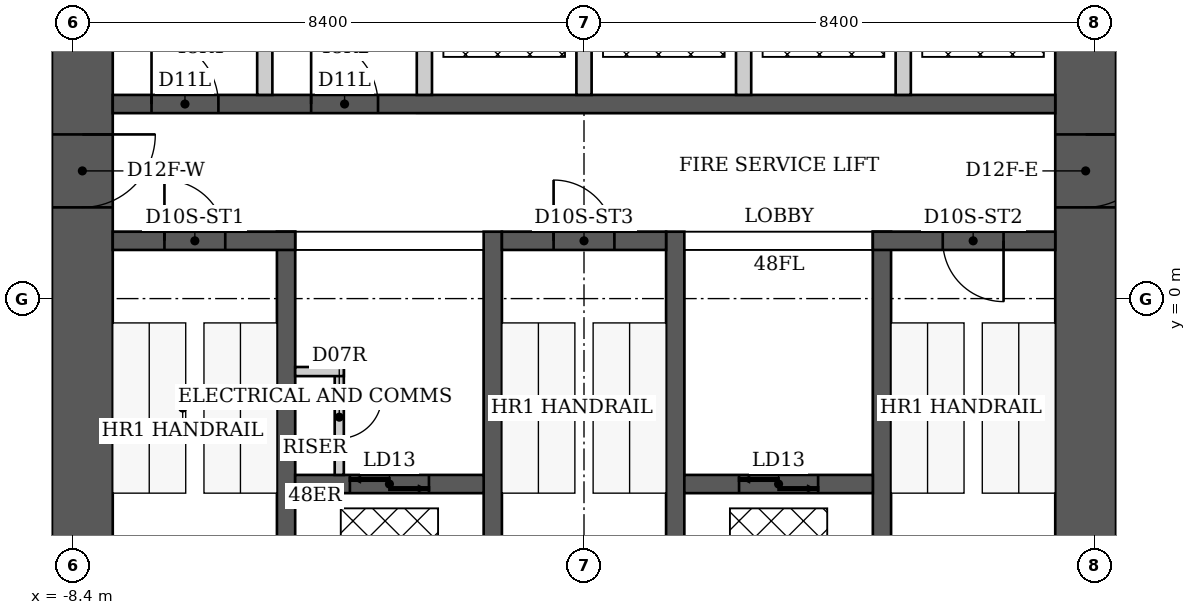
"""IFC4 building model, lengths in metres.
Left out: names, types, materials, properties, quantities, classifications, styles, units other than length and angle.
Written with IfcOpenShell. Run it as: python <this file> out.ifc"""

import sys

from ifc_helpers import new_model, si_unit, direction, frame, frame_2d, origin, place, context, subcontext, project, spatial, rectangle, extrude, element, fill, save


model = new_model("IFC4")
c1 = context("Model", 3, precision=1e-05, world=origin(), true_north=direction((0.0, 1.0)))
c2 = subcontext(c1, "Body", "Model", "MODEL_VIEW")
j1 = project(units=[si_unit("LENGTHUNIT", "METRE"), si_unit("PLANEANGLEUNIT", "RADIAN")], contexts=[c1])
p1 = place(None, origin())
s1 = spatial("IfcSite", under=j1, at=p1, CompositionType="ELEMENT")
p2 = place(p1, origin())
s2 = spatial("IfcBuilding", under=s1, at=p2, CompositionType="ELEMENT")
p3 = place(p2, frame((0.0, 0.0, 194.6)))
s3 = spatial("IfcBuildingStorey", under=s2, at=p3, CompositionType="ELEMENT", Elevation=194.6)
p4 = place(p3, frame((-8.25, -6.1, 0.0), z_axis=(0.0, 0.0, 1.0), x_axis=(0.0, 1.0, 0.0)))
e1 = element("IfcWall", 1, at=p4, inside=s3, PredefinedType="SHEAR", context=c2, shape_type="SweptSolid", body=[
    extrude(rectangle(XDim=12.2, YDim=1.0, at=frame_2d((6.1, 0.0))), origin(), (0.0, 0.0, 1.0), 3.8),
])
p5 = place(p4, frame((7.6, 0.0, 0.0)))
e2 = element("IfcOpeningElement", 2, at=p5, cuts=e1, PredefinedType="OPENING", context=c2, shape_type="SweptSolid", body=[
    extrude(rectangle(XDim=1.2, YDim=2.2, at=frame_2d((0.6, 1.1))), frame((0.0, 0.5, 0.0), z_axis=(0.0, -1.0, 0.0), x_axis=(1.0, 0.0, 0.0)), (0.0, 0.0, 1.0), 1.0),
])
p6 = place(p3, frame((8.25, -6.1, 0.0), z_axis=(0.0, 0.0, 1.0), x_axis=(0.0, 1.0, 0.0)))
e3 = element("IfcWall", 3, at=p6, inside=s3, PredefinedType="SHEAR", context=c2, shape_type="SweptSolid", body=[
    extrude(rectangle(XDim=12.2, YDim=1.0, at=frame_2d((6.1, 0.0))), origin(), (0.0, 0.0, 1.0), 3.8),
])
p7 = place(p6, frame((7.6, 0.0, 0.0)))
e4 = element("IfcOpeningElement", 4, at=p7, cuts=e3, PredefinedType="OPENING", context=c2, shape_type="SweptSolid", body=[
    extrude(rectangle(XDim=1.2, YDim=2.2, at=frame_2d((0.6, 1.1))), frame((0.0, 0.5, 0.0), z_axis=(0.0, -1.0, 0.0), x_axis=(1.0, 0.0, 0.0)), (0.0, 0.0, 1.0), 1.0),
])
for number, where, z_axis, x_axis in (
    (5, (-4.9, -6.1, 0.0), (0.0, 0.0, 1.0), (0.0, 1.0, 0.0)),
    (6, (-1.5, -6.1, 0.0), (0.0, 0.0, 1.0), (0.0, 1.0, 0.0)),
    (7, (1.5, -6.1, 0.0), (0.0, 0.0, 1.0), (0.0, 1.0, 0.0)),
    (8, (4.9, -6.1, 0.0), (0.0, 0.0, 1.0), (0.0, 1.0, 0.0)),
):
    element("IfcWall", number, at=place(p3, frame(where, z_axis=z_axis, x_axis=x_axis)), inside=s3, PredefinedType="SHEAR", context=c2, shape_type="SweptSolid", body=[
        extrude(rectangle(XDim=7.2, YDim=0.3, at=frame_2d((3.6, 0.0))), origin(), (0.0, 0.0, 1.0), 3.8),
    ])
p8 = place(p3, frame((-7.75, 0.95, 0.0), z_axis=(0.0, 0.0, 1.0), x_axis=(1.0, 0.0, 0.0)))
e9 = element("IfcWall", 9, at=p8, inside=s3, PredefinedType="SHEAR", context=c2, shape_type="SweptSolid", body=[
    extrude(rectangle(XDim=3.0, YDim=0.3, at=frame_2d((1.5, 0.0))), origin(), (0.0, 0.0, 1.0), 3.8),
])
p9 = place(p8, frame((0.85, 0.0, 0.0)))
e10 = element("IfcOpeningElement", 10, at=p9, cuts=e9, PredefinedType="OPENING", context=c2, shape_type="SweptSolid", body=[
    extrude(rectangle(XDim=1.0, YDim=2.2, at=frame_2d((0.5, 1.1))), frame((0.0, 0.15, 0.0), z_axis=(0.0, -1.0, 0.0), x_axis=(1.0, 0.0, 0.0)), (0.0, 0.0, 1.0), 0.3),
])
p10 = place(p3, frame((-1.35, 0.95, 0.0), z_axis=(0.0, 0.0, 1.0), x_axis=(1.0, 0.0, 0.0)))
e11 = element("IfcWall", 11, at=p10, inside=s3, PredefinedType="SHEAR", context=c2, shape_type="SweptSolid", body=[
    extrude(rectangle(XDim=2.7, YDim=0.3, at=frame_2d((1.35, 0.0))), origin(), (0.0, 0.0, 1.0), 3.8),
])
p11 = place(p10, frame((0.85, 0.0, 0.0)))
e12 = element("IfcOpeningElement", 12, at=p11, cuts=e11, PredefinedType="OPENING", context=c2, shape_type="SweptSolid", body=[
    extrude(rectangle(XDim=1.0, YDim=2.2, at=frame_2d((0.5, 1.1))), frame((0.0, 0.15, 0.0), z_axis=(0.0, -1.0, 0.0), x_axis=(1.0, 0.0, 0.0)), (0.0, 0.0, 1.0), 0.3),
])
p12 = place(p3, frame((4.75, 0.95, 0.0), z_axis=(0.0, 0.0, 1.0), x_axis=(1.0, 0.0, 0.0)))
e13 = element("IfcWall", 13, at=p12, inside=s3, PredefinedType="SHEAR", context=c2, shape_type="SweptSolid", body=[
    extrude(rectangle(XDim=3.0, YDim=0.3, at=frame_2d((1.5, 0.0))), origin(), (0.0, 0.0, 1.0), 3.8),
])
p13 = place(p12, frame((1.15, 0.0, 0.0)))
e14 = element("IfcOpeningElement", 14, at=p13, cuts=e13, PredefinedType="OPENING", context=c2, shape_type="SweptSolid", body=[
    extrude(rectangle(XDim=1.0, YDim=2.2, at=frame_2d((0.5, 1.1))), frame((0.0, 0.15, 0.0), z_axis=(0.0, -1.0, 0.0), x_axis=(1.0, 0.0, 0.0)), (0.0, 0.0, 1.0), 0.3),
])
p14 = place(p3, frame((-4.75, -3.05, 0.0), z_axis=(0.0, 0.0, 1.0), x_axis=(1.0, 0.0, 0.0)))
e15 = element("IfcWall", 15, at=p14, inside=s3, PredefinedType="SHEAR", context=c2, shape_type="SweptSolid", body=[
    extrude(rectangle(XDim=3.1, YDim=0.3, at=frame_2d((1.55, 0.0))), origin(), (0.0, 0.0, 1.0), 3.8),
])
p15 = place(p14, frame((0.9, 0.0, 0.0)))
e16 = element("IfcOpeningElement", 16, at=p15, cuts=e15, PredefinedType="OPENING", context=c2, shape_type="SweptSolid", body=[
    extrude(rectangle(XDim=1.3, YDim=2.1, at=frame_2d((0.65, 1.05))), frame((0.0, 0.15, 0.0), z_axis=(0.0, -1.0, 0.0), x_axis=(1.0, 0.0, 0.0)), (0.0, 0.0, 1.0), 0.3),
])
p16 = place(p3, frame((1.65, -3.05, 0.0), z_axis=(0.0, 0.0, 1.0), x_axis=(1.0, 0.0, 0.0)))
e17 = element("IfcWall", 17, at=p16, inside=s3, PredefinedType="SHEAR", context=c2, shape_type="SweptSolid", body=[
    extrude(rectangle(XDim=3.1, YDim=0.3, at=frame_2d((1.55, 0.0))), origin(), (0.0, 0.0, 1.0), 3.8),
])
p17 = place(p16, frame((0.9, 0.0, 0.0)))
e18 = element("IfcOpeningElement", 18, at=p17, cuts=e17, PredefinedType="OPENING", context=c2, shape_type="SweptSolid", body=[
    extrude(rectangle(XDim=1.3, YDim=2.1, at=frame_2d((0.65, 1.05))), frame((0.0, 0.15, 0.0), z_axis=(0.0, -1.0, 0.0), x_axis=(1.0, 0.0, 0.0)), (0.0, 0.0, 1.0), 0.3),
])
p18 = place(p3, frame((-7.75, 3.2, 0.0), z_axis=(0.0, 0.0, 1.0), x_axis=(1.0, 0.0, 0.0)))
e19 = element("IfcWall", 19, at=p18, inside=s3, PredefinedType="SHEAR", context=c2, shape_type="SweptSolid", body=[
    extrude(rectangle(XDim=15.5, YDim=0.3, at=frame_2d((7.75, 0.0))), origin(), (0.0, 0.0, 1.0), 3.8),
])
p19 = place(p18, frame((0.637, 0.0, 0.0)))
e20 = element("IfcOpeningElement", 20, at=p19, cuts=e19, PredefinedType="OPENING", context=c2, shape_type="SweptSolid", body=[
    extrude(rectangle(XDim=1.1, YDim=2.2, at=frame_2d((0.55, 1.1))), frame((0.0, 0.15, 0.0), z_axis=(0.0, -1.0, 0.0), x_axis=(1.0, 0.0, 0.0)), (0.0, 0.0, 1.0), 0.3),
])
p20 = place(p18, frame((3.262, 0.0, 0.0)))
e21 = element("IfcOpeningElement", 21, at=p20, cuts=e19, PredefinedType="OPENING", context=c2, shape_type="SweptSolid", body=[
    extrude(rectangle(XDim=1.1, YDim=2.2, at=frame_2d((0.55, 1.1))), frame((0.0, 0.15, 0.0), z_axis=(0.0, -1.0, 0.0), x_axis=(1.0, 0.0, 0.0)), (0.0, 0.0, 1.0), 0.3),
])
for number, where, z_axis, x_axis in (
    (22, (-5.25, 3.35, 0.0), (0.0, 0.0, 1.0), (0.0, 1.0, 0.0)),
    (23, (-2.625, 3.35, 0.0), (0.0, 0.0, 1.0), (0.0, 1.0, 0.0)),
    (24, (0.0, 3.35, 0.0), (0.0, 0.0, 1.0), (0.0, 1.0, 0.0)),
    (25, (2.625, 3.35, 0.0), (0.0, 0.0, 1.0), (0.0, 1.0, 0.0)),
    (26, (5.25, 3.35, 0.0), (0.0, 0.0, 1.0), (0.0, 1.0, 0.0)),
):
    element("IfcWall", number, at=place(p3, frame(where, z_axis=z_axis, x_axis=x_axis)), inside=s3, PredefinedType="PARTITIONING", context=c2, shape_type="SweptSolid", body=[
        extrude(rectangle(XDim=2.75, YDim=0.25, at=frame_2d((1.375, 0.0))), origin(), (0.0, 0.0, 1.0), 3.8),
    ])
p21 = place(p3, frame((-4.025, -2.9, 0.0), z_axis=(0.0, 0.0, 1.0), x_axis=(0.0, 1.0, 0.0)))
e27 = element("IfcWall", 27, at=p21, inside=s3, PredefinedType="PARTITIONING", context=c2, shape_type="SweptSolid", body=[
    extrude(rectangle(XDim=1.775, YDim=0.15, at=frame_2d((0.887, 0.0))), origin(), (0.0, 0.0, 1.0), 3.64),
])
p22 = place(p21, frame((0.6, 0.0, 0.0)))
e28 = element("IfcOpeningElement", 28, at=p22, cuts=e27, PredefinedType="OPENING", context=c2, shape_type="SweptSolid", body=[
    extrude(rectangle(XDim=0.7, YDim=2.1, at=frame_2d((0.35, 1.05))), frame((0.0, 0.075, 0.0), z_axis=(0.0, -1.0, 0.0), x_axis=(1.0, 0.0, 0.0)), (0.0, 0.0, 1.0), 0.15),
])
p23 = place(p3, frame((-4.75, -1.2, 0.0), z_axis=(0.0, 0.0, 1.0), x_axis=(1.0, 0.0, 0.0)))
e29 = element("IfcWall", 29, at=p23, inside=s3, PredefinedType="PARTITIONING", context=c2, shape_type="SweptSolid", body=[
    extrude(rectangle(XDim=0.8, YDim=0.15, at=frame_2d((0.4, 0.0))), origin(), (0.0, 0.0, 1.0), 3.64),
])
p24 = place(p9, origin())
e30 = element("IfcDoor", 30, at=p24, inside=s3, OperationType="SINGLE_SWING_LEFT", PredefinedType="DOOR", context=c2, shape_type="SweptSolid", body=[
    extrude(rectangle(XDim=1.0, YDim=2.2, at=frame_2d((0.5, 1.1))), frame((0.0, 0.025, 0.0), z_axis=(0.0, -1.0, 0.0), x_axis=(1.0, 0.0, 0.0)), (0.0, 0.0, 1.0), 0.05),
])
fill(e10, e30)
p25 = place(p11, origin())
e31 = element("IfcDoor", 31, at=p25, inside=s3, OperationType="SINGLE_SWING_LEFT", PredefinedType="DOOR", context=c2, shape_type="SweptSolid", body=[
    extrude(rectangle(XDim=1.0, YDim=2.2, at=frame_2d((0.5, 1.1))), frame((0.0, 0.025, 0.0), z_axis=(0.0, -1.0, 0.0), x_axis=(1.0, 0.0, 0.0)), (0.0, 0.0, 1.0), 0.05),
])
fill(e12, e31)
p26 = place(p13, origin())
e32 = element("IfcDoor", 32, at=p26, inside=s3, OperationType="SINGLE_SWING_RIGHT", PredefinedType="DOOR", context=c2, shape_type="SweptSolid", body=[
    extrude(rectangle(XDim=1.0, YDim=2.2, at=frame_2d((0.5, 1.1))), frame((0.0, 0.025, 0.0), z_axis=(0.0, -1.0, 0.0), x_axis=(1.0, 0.0, 0.0)), (0.0, 0.0, 1.0), 0.05),
])
fill(e14, e32)
p27 = place(p5, origin())
e33 = element("IfcDoor", 33, at=p27, inside=s3, OperationType="SINGLE_SWING_RIGHT", PredefinedType="DOOR", context=c2, shape_type="SweptSolid", body=[
    extrude(rectangle(XDim=1.2, YDim=2.2, at=frame_2d((0.6, 1.1))), frame((0.0, 0.025, 0.0), z_axis=(0.0, -1.0, 0.0), x_axis=(1.0, 0.0, 0.0)), (0.0, 0.0, 1.0), 0.05),
])
fill(e2, e33)
p28 = place(p7, origin())
e34 = element("IfcDoor", 34, at=p28, inside=s3, OperationType="SINGLE_SWING_RIGHT", PredefinedType="DOOR", context=c2, shape_type="SweptSolid", body=[
    extrude(rectangle(XDim=1.2, YDim=2.2, at=frame_2d((0.6, 1.1))), frame((0.0, 0.025, 0.0), z_axis=(0.0, -1.0, 0.0), x_axis=(1.0, 0.0, 0.0)), (0.0, 0.0, 1.0), 0.05),
])
fill(e4, e34)
p29 = place(p22, origin())
e35 = element("IfcDoor", 35, at=p29, inside=s3, OperationType="SINGLE_SWING_RIGHT", PredefinedType="DOOR", context=c2, shape_type="SweptSolid", body=[
    extrude(rectangle(XDim=0.7, YDim=2.1, at=frame_2d((0.35, 1.05))), frame((0.0, 0.025, 0.0), z_axis=(0.0, -1.0, 0.0), x_axis=(1.0, 0.0, 0.0)), (0.0, 0.0, 1.0), 0.05),
])
fill(e28, e35)
p30 = place(p19, origin())
e36 = element("IfcDoor", 36, at=p30, inside=s3, OperationType="SINGLE_SWING_LEFT", PredefinedType="DOOR", context=c2, shape_type="SweptSolid", body=[
    extrude(rectangle(XDim=1.1, YDim=2.2, at=frame_2d((0.55, 1.1))), frame((0.0, 0.025, 0.0), z_axis=(0.0, -1.0, 0.0), x_axis=(1.0, 0.0, 0.0)), (0.0, 0.0, 1.0), 0.05),
])
fill(e20, e36)
p31 = place(p20, origin())
e37 = element("IfcDoor", 37, at=p31, inside=s3, OperationType="SINGLE_SWING_LEFT", PredefinedType="DOOR", context=c2, shape_type="SweptSolid", body=[
    extrude(rectangle(XDim=1.1, YDim=2.2, at=frame_2d((0.55, 1.1))), frame((0.0, 0.025, 0.0), z_axis=(0.0, -1.0, 0.0), x_axis=(1.0, 0.0, 0.0)), (0.0, 0.0, 1.0), 0.05),
])
fill(e21, e37)
p32 = place(p15, origin())
e38 = element("IfcDoor", 38, at=p32, inside=s3, OperationType="DOUBLE_DOOR_SLIDING", PredefinedType="DOOR", context=c2, shape_type="SweptSolid", body=[
    extrude(rectangle(XDim=1.3, YDim=2.1, at=frame_2d((0.65, 1.05))), frame((0.0, 0.025, 0.0), z_axis=(0.0, -1.0, 0.0), x_axis=(1.0, 0.0, 0.0)), (0.0, 0.0, 1.0), 0.05),
])
fill(e16, e38)
p33 = place(p17, origin())
e39 = element("IfcDoor", 39, at=p33, inside=s3, OperationType="DOUBLE_DOOR_SLIDING", PredefinedType="DOOR", context=c2, shape_type="SweptSolid", body=[
    extrude(rectangle(XDim=1.3, YDim=2.1, at=frame_2d((0.65, 1.05))), frame((0.0, 0.025, 0.0), z_axis=(0.0, -1.0, 0.0), x_axis=(1.0, 0.0, 0.0)), (0.0, 0.0, 1.0), 0.05),
])
fill(e18, e39)
save(model, sys.argv[1])
